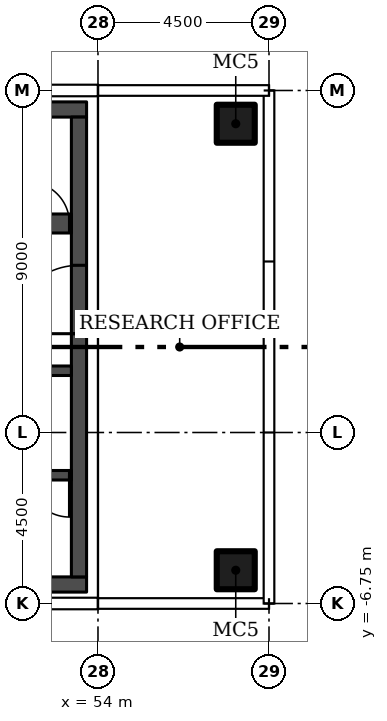
"""IFC4 building model, lengths in metres.
Left out: names, types, materials, properties, quantities, classifications, styles, units other than length and angle.
Written with IfcOpenShell. Run it as: python <this file> out.ifc"""

import sys

from ifc_helpers import new_model, si_unit, direction, frame, frame_2d, origin, origin_2d, place, context, subcontext, project, spatial, rectangle, hollow_rectangle, extrude, element, fill, save


model = new_model("IFC4")
c1 = context("Model", 3, precision=1e-05, world=origin(), true_north=direction((0.0, 1.0)))
c2 = subcontext(c1, "Body", "Model", "MODEL_VIEW")
j1 = project(units=[si_unit("LENGTHUNIT", "METRE"), si_unit("PLANEANGLEUNIT", "RADIAN")], contexts=[c1])
p1 = place(None, origin())
s1 = spatial("IfcSite", under=j1, at=p1, CompositionType="ELEMENT")
p2 = place(p1, origin())
s2 = spatial("IfcBuilding", under=s1, at=p2, CompositionType="ELEMENT")
p3 = place(p2, frame((0.0, 0.0, 186.6)))
s3 = spatial("IfcBuildingStorey", under=s2, at=p3, CompositionType="ELEMENT", Elevation=186.6)
for number, where in (
    (1, (57.625, -5.875, 0.0)),
    (2, (57.625, 5.875, 0.0)),
):
    element("IfcColumn", number, at=place(p3, frame(where)), inside=s3, PredefinedType="COLUMN", context=c2, shape_type="SweptSolid", body=[
        extrude(hollow_rectangle(XDim=1.0, YDim=1.0, WallThickness=0.04, at=origin_2d()), origin(), (0.0, 0.0, 1.0), 3.55),
    ])
for number, where, z_axis, x_axis in (
    (3, (53.7, -6.25, 0.0), (0.0, 0.0, 1.0), (-1.0, 0.0, 0.0)),
    (4, (53.7, 6.25, 0.0), (0.0, 0.0, 1.0), (-1.0, 0.0, 0.0)),
):
    element("IfcWall", number, at=place(p3, frame(where, z_axis=z_axis, x_axis=x_axis)), inside=s3, PredefinedType="SHEAR", context=c2, shape_type="SweptSolid", body=[
        extrude(rectangle(XDim=12.9, YDim=0.4, at=frame_2d((6.45, 0.0))), origin(), (0.0, 0.0, 1.0), 3.55),
    ])
p4 = place(p3, frame((53.5, -6.05, 0.0), z_axis=(0.0, 0.0, 1.0), x_axis=(0.0, 1.0, 0.0)))
e5 = element("IfcWall", 5, at=p4, inside=s3, PredefinedType="SHEAR", context=c2, shape_type="SweptSolid", body=[
    extrude(rectangle(XDim=12.1, YDim=0.4, at=frame_2d((6.05, 0.0))), origin(), (0.0, 0.0, 1.0), 3.55),
])
p5 = place(p4, frame((6.4, 0.0, 0.0)))
e6 = element("IfcOpeningElement", 6, at=p5, cuts=e5, PredefinedType="OPENING", context=c2, shape_type="SweptSolid", body=[
    extrude(rectangle(XDim=1.8, YDim=2.4, at=frame_2d((0.9, 1.2))), frame((0.0, 0.21, 0.0), z_axis=(0.0, -1.0, 0.0), x_axis=(1.0, 0.0, 0.0)), (0.0, 0.0, 1.0), 0.42),
])
p6 = place(p3, frame((53.3, -3.375, 0.0), z_axis=(0.0, 0.0, 1.0), x_axis=(-1.0, 0.0, 0.0)))
e7 = element("IfcWall", 7, at=p6, inside=s3, PredefinedType="SHEAR", context=c2, shape_type="SweptSolid", body=[
    extrude(rectangle(XDim=12.1, YDim=0.25, at=frame_2d((6.05, 0.0))), origin(), (0.0, 0.0, 1.0), 3.55),
])
p7 = place(p6, frame((0.05, 0.0, 0.0)))
e8 = element("IfcOpeningElement", 8, at=p7, cuts=e7, PredefinedType="OPENING", context=c2, shape_type="SweptSolid", body=[
    extrude(rectangle(XDim=1.1, YDim=2.1, at=frame_2d((0.55, 1.05))), frame((0.0, 0.135, 0.0), z_axis=(0.0, -1.0, 0.0), x_axis=(1.0, 0.0, 0.0)), (0.0, 0.0, 1.0), 0.27),
])
p8 = place(p3, frame((53.3, -0.625, 0.0), z_axis=(0.0, 0.0, 1.0), x_axis=(-1.0, 0.0, 0.0)))
e9 = element("IfcWall", 9, at=p8, inside=s3, PredefinedType="SHEAR", context=c2, shape_type="SweptSolid", body=[
    extrude(rectangle(XDim=12.1, YDim=0.25, at=frame_2d((6.05, 0.0))), origin(), (0.0, 0.0, 1.0), 3.55),
])
p9 = place(p8, frame((2.25, 0.0, 0.0)))
e10 = element("IfcOpeningElement", 10, at=p9, cuts=e9, PredefinedType="OPENING", context=c2, shape_type="SweptSolid", body=[
    extrude(rectangle(XDim=1.2, YDim=2.1, at=frame_2d((0.6, 1.05))), frame((0.0, 0.135, 0.0), z_axis=(0.0, -1.0, 0.0), x_axis=(1.0, 0.0, 0.0)), (0.0, 0.0, 1.0), 0.27),
])
p10 = place(p8, frame((10.025, 0.0, 0.0)))
e11 = element("IfcOpeningElement", 11, at=p10, cuts=e9, PredefinedType="OPENING", context=c2, shape_type="SweptSolid", body=[
    extrude(rectangle(XDim=0.9, YDim=2.1, at=frame_2d((0.45, 1.05))), frame((0.0, 0.135, 0.0), z_axis=(0.0, -1.0, 0.0), x_axis=(1.0, 0.0, 0.0)), (0.0, 0.0, 1.0), 0.27),
])
p11 = place(p3, frame((46.0, 3.25, 0.0)))
e12 = element("IfcWall", 12, at=p11, inside=s3, PredefinedType="SHEAR", context=c2, shape_type="SweptSolid", body=[
    extrude(rectangle(XDim=7.3, YDim=0.5, at=frame_2d((3.65, 0.0))), origin(), (0.0, 0.0, 1.0), 3.55),
])
p12 = place(p11, frame((6.15, 0.0, 0.0)))
e13 = element("IfcOpeningElement", 13, at=p12, cuts=e12, PredefinedType="OPENING", context=c2, shape_type="SweptSolid", body=[
    extrude(rectangle(XDim=1.1, YDim=2.1, at=frame_2d((0.55, 1.05))), frame((0.0, 0.26, 0.0), z_axis=(0.0, -1.0, 0.0), x_axis=(1.0, 0.0, 0.0)), (0.0, 0.0, 1.0), 0.52),
])
p13 = place(p5, origin())
e14 = element("IfcDoor", 14, at=p13, inside=s3, OperationType="DOUBLE_DOOR_SINGLE_SWING", PredefinedType="DOOR", context=c2, shape_type="SweptSolid", body=[
    extrude(rectangle(XDim=1.8, YDim=2.4, at=frame_2d((0.9, 1.2))), frame((0.0, 0.025, 0.0), z_axis=(0.0, -1.0, 0.0), x_axis=(1.0, 0.0, 0.0)), (0.0, 0.0, 1.0), 0.05),
])
fill(e6, e14)
p14 = place(p7, origin())
e15 = element("IfcDoor", 15, at=p14, inside=s3, OperationType="SINGLE_SWING_LEFT", PredefinedType="DOOR", context=c2, shape_type="SweptSolid", body=[
    extrude(rectangle(XDim=1.1, YDim=2.1, at=frame_2d((0.55, 1.05))), frame((0.0, 0.025, 0.0), z_axis=(0.0, -1.0, 0.0), x_axis=(1.0, 0.0, 0.0)), (0.0, 0.0, 1.0), 0.05),
])
fill(e8, e15)
p15 = place(p12, origin())
e16 = element("IfcDoor", 16, at=p15, inside=s3, OperationType="SINGLE_SWING_RIGHT", PredefinedType="DOOR", context=c2, shape_type="SweptSolid", body=[
    extrude(rectangle(XDim=1.1, YDim=2.1, at=frame_2d((0.55, 1.05))), frame((0.0, 0.025, 0.0), z_axis=(0.0, -1.0, 0.0), x_axis=(1.0, 0.0, 0.0)), (0.0, 0.0, 1.0), 0.05),
])
fill(e13, e16)
save(model, sys.argv[1])
